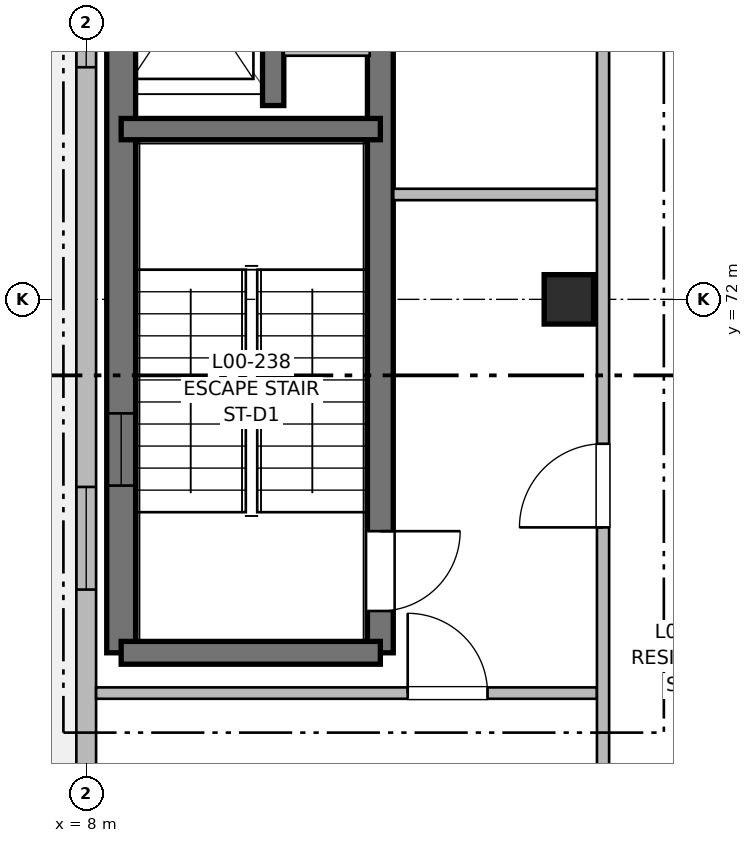
"""IFC4 building model, lengths in metres.
Left out: names, types, materials, properties, quantities, classifications, styles, units other than length and angle.
Written with IfcOpenShell. Run it as: python <this file> out.ifc"""

import sys

from ifc_helpers import new_model, si_unit, direction, frame, frame_2d, origin, origin_2d, place, context, subcontext, project, spatial, rectangle, extrude, element, fill, save


model = new_model("IFC4")
c1 = context("Model", 3, precision=1e-05, world=origin(), true_north=direction((0.0, 1.0)))
c2 = subcontext(c1, "Body", "Model", "MODEL_VIEW")
j1 = project(units=[si_unit("LENGTHUNIT", "METRE"), si_unit("PLANEANGLEUNIT", "RADIAN")], contexts=[c1])
p1 = place(None, origin())
s1 = spatial("IfcSite", under=j1, at=p1, CompositionType="ELEMENT")
p2 = place(p1, origin())
s2 = spatial("IfcBuilding", under=s1, at=p2, CompositionType="ELEMENT")
p3 = place(p2, origin())
s3 = spatial("IfcBuildingStorey", under=s2, at=p3, CompositionType="ELEMENT", Elevation=0.0)
p4 = place(p3, frame((14.35, 72.0, 0.0), z_axis=(0.0, 0.0, 1.0), x_axis=(1.0, 0.0, 0.0)))
e1 = element("IfcColumn", 1, at=p4, inside=s3, PredefinedType="COLUMN", context=c2, shape_type="SweptSolid", body=[
    extrude(rectangle(XDim=0.65, YDim=0.65, at=origin_2d()), origin(), (0.0, 0.0, 1.0), 4.16),
])
p5 = place(p3, frame((8.46, 67.35, 0.0), z_axis=(0.0, 0.0, 1.0), x_axis=(0.0, 1.0, 0.0)))
e2 = element("IfcWall", 2, at=p5, inside=s3, PredefinedType="SHEAR", context=c2, shape_type="SweptSolid", body=[
    extrude(rectangle(XDim=12.45, YDim=0.38, at=frame_2d((6.225, 0.0))), origin(), (0.0, 0.0, 1.0), 4.16),
])
p6 = place(p5, frame((2.2, 0.0, 1.2)))
e3 = element("IfcOpeningElement", 3, at=p6, cuts=e2, PredefinedType="OPENING", context=c2, shape_type="SweptSolid", body=[
    extrude(rectangle(XDim=0.95, YDim=1.25, at=frame_2d((0.475, 0.625))), frame((0.0, 0.2, 0.0), z_axis=(0.0, -1.0, 0.0), x_axis=(1.0, 0.0, 0.0)), (0.0, 0.0, 1.0), 0.4),
])
p7 = place(p3, frame((11.87, 79.8, 0.0), z_axis=(0.0, 0.0, 1.0), x_axis=(0.0, -1.0, 0.0)))
e4 = element("IfcWall", 4, at=p7, inside=s3, PredefinedType="SHEAR", context=c2, shape_type="SweptSolid", body=[
    extrude(rectangle(XDim=12.45, YDim=0.34, at=frame_2d((6.225, 0.0))), origin(), (0.0, 0.0, 1.0), 4.16),
])
p8 = place(p7, frame((10.85, 0.0, 0.0)))
e5 = element("IfcOpeningElement", 5, at=p8, cuts=e4, PredefinedType="OPENING", context=c2, shape_type="SweptSolid", body=[
    extrude(rectangle(XDim=1.05, YDim=2.15, at=frame_2d((0.525, 1.075))), frame((0.0, 0.18, 0.0), z_axis=(0.0, -1.0, 0.0), x_axis=(1.0, 0.0, 0.0)), (0.0, 0.0, 1.0), 0.36),
])
p9 = place(p3, frame((11.87, 67.35, 0.0), z_axis=(0.0, 0.0, 1.0), x_axis=(-1.0, 0.0, 0.0)))
e6 = element("IfcWall", 6, at=p9, inside=s3, PredefinedType="SHEAR", context=c2, shape_type="SweptSolid", body=[
    extrude(rectangle(XDim=3.41, YDim=0.3, at=frame_2d((1.705, 0.0))), origin(), (0.0, 0.0, 1.0), 4.16),
])
p10 = place(p3, frame((8.46, 74.24, 0.0), z_axis=(0.0, 0.0, 1.0), x_axis=(1.0, 0.0, 0.0)))
e7 = element("IfcWall", 7, at=p10, inside=s3, PredefinedType="SHEAR", context=c2, shape_type="SweptSolid", body=[
    extrude(rectangle(XDim=3.41, YDim=0.28, at=frame_2d((1.705, 0.0))), origin(), (0.0, 0.0, 1.0), 4.16),
])
p11 = place(p3, frame((10.46, 74.55, 0.0), z_axis=(0.0, 0.0, 1.0), x_axis=(0.0, 1.0, 0.0)))
e8 = element("IfcWall", 8, at=p11, inside=s3, PredefinedType="SHEAR", context=c2, shape_type="SweptSolid", body=[
    extrude(rectangle(XDim=5.25, YDim=0.28, at=frame_2d((2.625, 0.0))), origin(), (0.0, 0.0, 1.0), 4.16),
])
p12 = place(p11, frame((1.15, 0.0, 0.0)))
e9 = element("IfcOpeningElement", 9, at=p12, cuts=e8, PredefinedType="OPENING", context=c2, shape_type="SweptSolid", body=[
    extrude(rectangle(XDim=1.0, YDim=2.15, at=frame_2d((0.5, 1.075))), frame((0.0, 0.15, 0.0), z_axis=(0.0, -1.0, 0.0), x_axis=(1.0, 0.0, 0.0)), (0.0, 0.0, 1.0), 0.3),
])
p13 = place(p11, frame((3.85, 0.0, 0.0)))
e10 = element("IfcOpeningElement", 10, at=p13, cuts=e8, PredefinedType="OPENING", context=c2, shape_type="SweptSolid", body=[
    extrude(rectangle(XDim=0.9, YDim=2.15, at=frame_2d((0.45, 1.075))), frame((0.0, 0.15, 0.0), z_axis=(0.0, -1.0, 0.0), x_axis=(1.0, 0.0, 0.0)), (0.0, 0.0, 1.0), 0.3),
])
p14 = place(p3, frame((10.6, 75.28, 0.0), z_axis=(0.0, 0.0, 1.0), x_axis=(1.0, 0.0, 0.0)))
e11 = element("IfcWall", 11, at=p14, inside=s3, PredefinedType="PARTITIONING", context=c2, shape_type="SweptSolid", body=[
    extrude(rectangle(XDim=1.13, YDim=0.15, at=frame_2d((0.565, 0.0))), origin(), (0.0, 0.0, 1.0), 3.91),
])
p15 = place(p3, frame((8.0, 56.0, 0.0), z_axis=(0.0, 0.0, 1.0), x_axis=(0.0, 1.0, 0.0)))
e12 = element("IfcWall", 12, at=p15, inside=s3, PredefinedType="SOLIDWALL", context=c2, shape_type="SweptSolid", body=[
    extrude(rectangle(XDim=60.0, YDim=0.26, at=frame_2d((30.0, 0.0))), origin(), (0.0, 0.0, 1.0), 3.94),
])
p16 = place(p15, frame((3.211, 0.0, 0.95)))
e13 = element("IfcOpeningElement", 13, at=p16, cuts=e12, PredefinedType="OPENING", context=c2, shape_type="SweptSolid", body=[
    extrude(rectangle(XDim=2.15, YDim=1.8, at=frame_2d((1.075, 0.9))), frame((0.0, 0.14, 0.0), z_axis=(0.0, -1.0, 0.0), x_axis=(1.0, 0.0, 0.0)), (0.0, 0.0, 1.0), 0.28),
])
p17 = place(p15, frame((12.182, 0.0, 0.95)))
e14 = element("IfcOpeningElement", 14, at=p17, cuts=e12, PredefinedType="OPENING", context=c2, shape_type="SweptSolid", body=[
    extrude(rectangle(XDim=1.35, YDim=1.3, at=frame_2d((0.675, 0.65))), frame((0.0, 0.14, 0.0), z_axis=(0.0, -1.0, 0.0), x_axis=(1.0, 0.0, 0.0)), (0.0, 0.0, 1.0), 0.28),
])
p18 = place(p15, frame((19.054, 0.0, 0.95)))
e15 = element("IfcOpeningElement", 15, at=p18, cuts=e12, PredefinedType="OPENING", context=c2, shape_type="SweptSolid", body=[
    extrude(rectangle(XDim=2.15, YDim=1.8, at=frame_2d((1.075, 0.9))), frame((0.0, 0.14, 0.0), z_axis=(0.0, -1.0, 0.0), x_axis=(1.0, 0.0, 0.0)), (0.0, 0.0, 1.0), 0.28),
])
p19 = place(p15, frame((29.325, 0.0, 0.95)))
e16 = element("IfcOpeningElement", 16, at=p19, cuts=e12, PredefinedType="OPENING", context=c2, shape_type="SweptSolid", body=[
    extrude(rectangle(XDim=1.35, YDim=1.3, at=frame_2d((0.675, 0.65))), frame((0.0, 0.14, 0.0), z_axis=(0.0, -1.0, 0.0), x_axis=(1.0, 0.0, 0.0)), (0.0, 0.0, 1.0), 0.28),
])
p20 = place(p15, frame((37.496, 0.0, 0.95)))
e17 = element("IfcOpeningElement", 17, at=p20, cuts=e12, PredefinedType="OPENING", context=c2, shape_type="SweptSolid", body=[
    extrude(rectangle(XDim=2.15, YDim=1.8, at=frame_2d((1.075, 0.9))), frame((0.0, 0.14, 0.0), z_axis=(0.0, -1.0, 0.0), x_axis=(1.0, 0.0, 0.0)), (0.0, 0.0, 1.0), 0.28),
])
p21 = place(p15, frame((46.468, 0.0, 0.95)))
e18 = element("IfcOpeningElement", 18, at=p21, cuts=e12, PredefinedType="OPENING", context=c2, shape_type="SweptSolid", body=[
    extrude(rectangle(XDim=1.35, YDim=1.3, at=frame_2d((0.675, 0.65))), frame((0.0, 0.14, 0.0), z_axis=(0.0, -1.0, 0.0), x_axis=(1.0, 0.0, 0.0)), (0.0, 0.0, 1.0), 0.28),
])
p22 = place(p15, frame((54.639, 0.0, 0.95)))
e19 = element("IfcOpeningElement", 19, at=p22, cuts=e12, PredefinedType="OPENING", context=c2, shape_type="SweptSolid", body=[
    extrude(rectangle(XDim=2.15, YDim=1.8, at=frame_2d((1.075, 0.9))), frame((0.0, 0.14, 0.0), z_axis=(0.0, -1.0, 0.0), x_axis=(1.0, 0.0, 0.0)), (0.0, 0.0, 1.0), 0.28),
])
p23 = place(p3, frame((8.13, 66.82, 0.0), z_axis=(0.0, 0.0, 1.0), x_axis=(1.0, 0.0, 0.0)))
e20 = element("IfcWall", 20, at=p23, inside=s3, PredefinedType="PARTITIONING", context=c2, shape_type="SweptSolid", body=[
    extrude(rectangle(XDim=6.59, YDim=0.15, at=frame_2d((3.295, 0.0))), origin(), (0.0, 0.0, 1.0), 3.895),
])
p24 = place(p23, frame((4.1, 0.0, 0.0)))
e21 = element("IfcOpeningElement", 21, at=p24, cuts=e20, PredefinedType="OPENING", context=c2, shape_type="SweptSolid", body=[
    extrude(rectangle(XDim=1.05, YDim=2.15, at=frame_2d((0.525, 1.075))), frame((0.0, 0.085, 0.0), z_axis=(0.0, -1.0, 0.0), x_axis=(1.0, 0.0, 0.0)), (0.0, 0.0, 1.0), 0.17),
])
p25 = place(p3, frame((12.04, 73.38, 0.0), z_axis=(0.0, 0.0, 1.0), x_axis=(1.0, 0.0, 0.0)))
e22 = element("IfcWall", 22, at=p25, inside=s3, PredefinedType="PARTITIONING", context=c2, shape_type="SweptSolid", body=[
    extrude(rectangle(XDim=2.68, YDim=0.15, at=frame_2d((1.34, 0.0))), origin(), (0.0, 0.0, 1.0), 3.895),
])
p26 = place(p3, frame((14.8, 56.18, 0.0), z_axis=(0.0, 0.0, 1.0), x_axis=(0.0, 1.0, 0.0)))
e23 = element("IfcWall", 23, at=p26, inside=s3, PredefinedType="PARTITIONING", context=c2, shape_type="SweptSolid", body=[
    extrude(rectangle(XDim=50.62, YDim=0.16, at=frame_2d((25.31, 0.0))), origin(), (0.0, 0.0, 1.0), 3.895),
])
p27 = place(p26, frame((12.82, 0.0, 0.0)))
e24 = element("IfcOpeningElement", 24, at=p27, cuts=e23, PredefinedType="OPENING", context=c2, shape_type="SweptSolid", body=[
    extrude(rectangle(XDim=1.1, YDim=2.15, at=frame_2d((0.55, 1.075))), frame((0.0, 0.09, 0.0), z_axis=(0.0, -1.0, 0.0), x_axis=(1.0, 0.0, 0.0)), (0.0, 0.0, 1.0), 0.18),
])
p28 = place(p26, frame((19.22, 0.0, 0.0)))
e25 = element("IfcOpeningElement", 25, at=p28, cuts=e23, PredefinedType="OPENING", context=c2, shape_type="SweptSolid", body=[
    extrude(rectangle(XDim=1.6, YDim=2.15, at=frame_2d((0.8, 1.075))), frame((0.0, 0.09, 0.0), z_axis=(0.0, -1.0, 0.0), x_axis=(1.0, 0.0, 0.0)), (0.0, 0.0, 1.0), 0.18),
])
p29 = place(p26, frame((3.5, 0.0, 0.0)))
e26 = element("IfcOpeningElement", 26, at=p29, cuts=e23, PredefinedType="OPENING", context=c2, shape_type="SweptSolid", body=[
    extrude(rectangle(XDim=1.05, YDim=2.15, at=frame_2d((0.525, 1.075))), frame((0.0, 0.09, 0.0), z_axis=(0.0, -1.0, 0.0), x_axis=(1.0, 0.0, 0.0)), (0.0, 0.0, 1.0), 0.18),
])
p30 = place(p26, frame((29.2, 0.0, 0.0)))
e27 = element("IfcOpeningElement", 27, at=p30, cuts=e23, PredefinedType="OPENING", context=c2, shape_type="SweptSolid", body=[
    extrude(rectangle(XDim=1.55, YDim=2.2, at=frame_2d((0.775, 1.1))), frame((0.0, 0.09, 0.0), z_axis=(0.0, -1.0, 0.0), x_axis=(1.0, 0.0, 0.0)), (0.0, 0.0, 1.0), 0.18),
])
p31 = place(p8, origin())
e28 = element("IfcDoor", 28, at=p31, inside=s3, OperationType="SINGLE_SWING_LEFT", PredefinedType="DOOR", context=c2, shape_type="SweptSolid", body=[
    extrude(rectangle(XDim=1.05, YDim=2.15, at=frame_2d((0.525, 1.075))), frame((0.0, 0.025, 0.0), z_axis=(0.0, -1.0, 0.0), x_axis=(1.0, 0.0, 0.0)), (0.0, 0.0, 1.0), 0.05),
])
fill(e5, e28)
p32 = place(p6, origin())
e29 = element("IfcWindow", 29, at=p32, inside=s3, PartitioningType="SINGLE_PANEL", PredefinedType="WINDOW", context=c2, shape_type="SweptSolid", body=[
    extrude(rectangle(XDim=0.95, YDim=1.25, at=frame_2d((0.475, 0.625))), frame((0.0, 0.03, 0.0), z_axis=(0.0, -1.0, 0.0), x_axis=(1.0, 0.0, 0.0)), (0.0, 0.0, 1.0), 0.06),
])
fill(e3, e29)
p33 = place(p17, origin())
e30 = element("IfcWindow", 30, at=p33, inside=s3, PartitioningType="SINGLE_PANEL", PredefinedType="WINDOW", context=c2, shape_type="SweptSolid", body=[
    extrude(rectangle(XDim=1.35, YDim=1.3, at=frame_2d((0.675, 0.65))), frame((0.0, 0.03, 0.0), z_axis=(0.0, -1.0, 0.0), x_axis=(1.0, 0.0, 0.0)), (0.0, 0.0, 1.0), 0.06),
])
fill(e14, e30)
p34 = place(p18, origin())
e31 = element("IfcWindow", 31, at=p34, inside=s3, PartitioningType="SINGLE_PANEL", PredefinedType="WINDOW", context=c2, shape_type="SweptSolid", body=[
    extrude(rectangle(XDim=2.15, YDim=1.8, at=frame_2d((1.075, 0.9))), frame((0.0, 0.03, 0.0), z_axis=(0.0, -1.0, 0.0), x_axis=(1.0, 0.0, 0.0)), (0.0, 0.0, 1.0), 0.06),
])
fill(e15, e31)
p35 = place(p27, origin())
e32 = element("IfcDoor", 32, at=p35, inside=s3, OperationType="SINGLE_SWING_LEFT", PredefinedType="DOOR", context=c2, shape_type="SweptSolid", body=[
    extrude(rectangle(XDim=1.1, YDim=2.15, at=frame_2d((0.55, 1.075))), frame((0.0, 0.025, 0.0), z_axis=(0.0, -1.0, 0.0), x_axis=(1.0, 0.0, 0.0)), (0.0, 0.0, 1.0), 0.05),
])
fill(e24, e32)
p36 = place(p24, origin())
e33 = element("IfcDoor", 33, at=p36, inside=s3, OperationType="SINGLE_SWING_LEFT", PredefinedType="DOOR", context=c2, shape_type="SweptSolid", body=[
    extrude(rectangle(XDim=1.05, YDim=2.15, at=frame_2d((0.525, 1.075))), frame((0.0, 0.025, 0.0), z_axis=(0.0, -1.0, 0.0), x_axis=(1.0, 0.0, 0.0)), (0.0, 0.0, 1.0), 0.05),
])
fill(e21, e33)
save(model, sys.argv[1])
